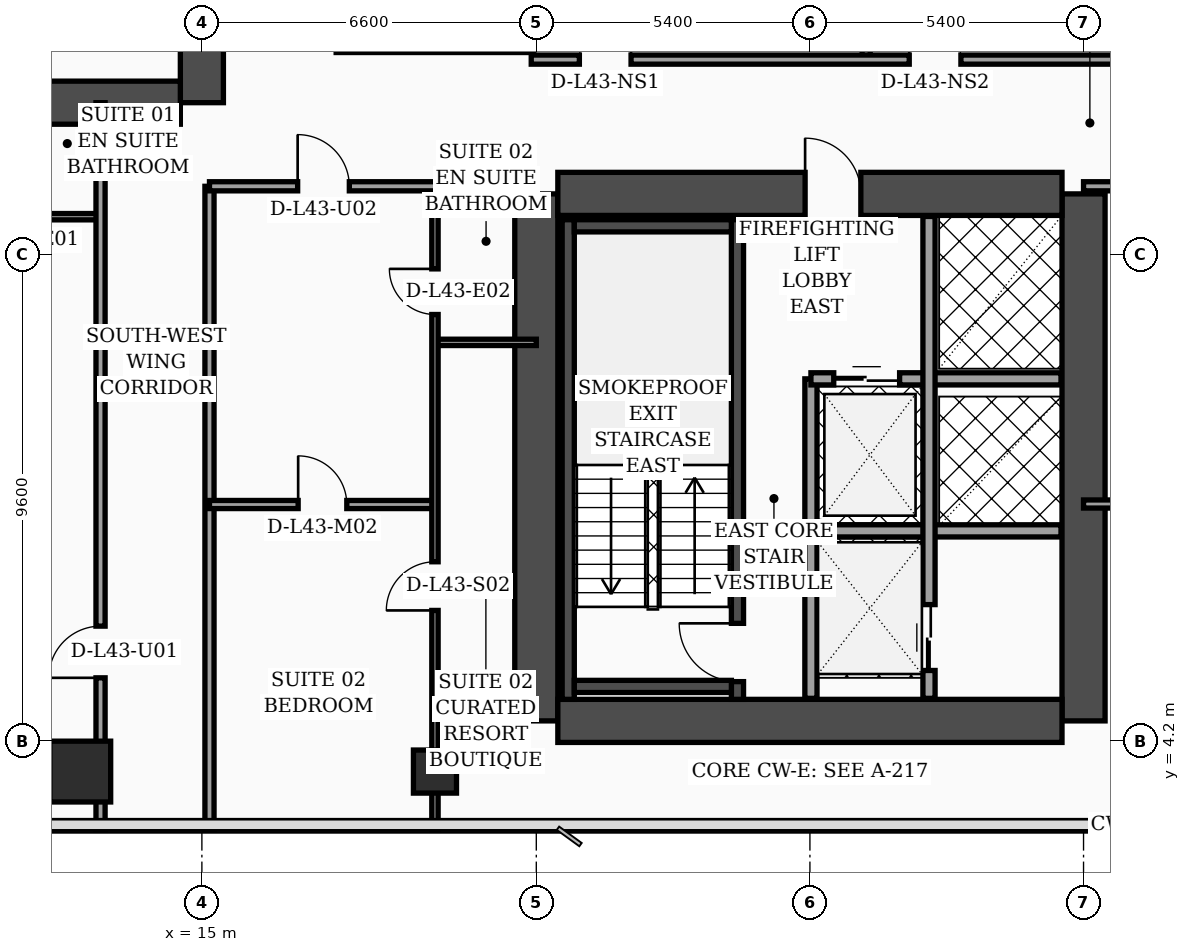
"""IFC4 building model, lengths in metres.
Left out: names, types, materials, properties, quantities, classifications, styles, units other than length and angle.
Written with IfcOpenShell. Run it as: python <this file> out.ifc"""

import sys

from ifc_helpers import new_model, si_unit, direction, frame, frame_2d, origin, origin_2d, place, context, subcontext, project, spatial, rectangle, hollow_rectangle, extrude, element, fill, save


model = new_model("IFC4")
c1 = context("Model", 3, precision=1e-05, world=origin(), true_north=direction((0.0, 1.0)))
c2 = subcontext(c1, "Body", "Model", "MODEL_VIEW")
j1 = project(units=[si_unit("LENGTHUNIT", "METRE"), si_unit("PLANEANGLEUNIT", "RADIAN")], contexts=[c1])
p1 = place(None, origin())
s1 = spatial("IfcSite", under=j1, at=p1, CompositionType="ELEMENT")
p2 = place(p1, origin())
s2 = spatial("IfcBuilding", under=s1, at=p2, CompositionType="ELEMENT")
p3 = place(p2, frame((0.0, 0.0, 175.1)))
s3 = spatial("IfcBuildingStorey", under=s2, at=p3, CompositionType="ELEMENT", Elevation=175.1)
p4 = place(p3, frame((15.0, 16.8, 0.0), z_axis=(0.0, 0.0, 1.0), x_axis=(0.0, 1.0, 0.0)))
e1 = element("IfcWall", 1, at=p4, inside=s3, PredefinedType="SHEAR", context=c2, shape_type="SweptSolid", body=[
    extrude(rectangle(XDim=21.6, YDim=0.85, at=frame_2d((10.8, 0.0))), origin(), (0.0, 0.0, 1.0), 3.56),
])
p5 = place(p4, frame((8.65, 0.0, 0.0)))
e2 = element("IfcOpeningElement", 2, at=p5, cuts=e1, PredefinedType="OPENING", context=c2, shape_type="SweptSolid", body=[
    extrude(rectangle(XDim=1.1, YDim=2.2, at=frame_2d((0.55, 1.1))), frame((0.0, 0.435, 0.0), z_axis=(0.0, -1.0, 0.0), x_axis=(1.0, 0.0, 0.0)), (0.0, 0.0, 1.0), 0.87),
])
p6 = place(p4, frame((10.85, 0.0, 0.0)))
e3 = element("IfcOpeningElement", 3, at=p6, cuts=e1, PredefinedType="OPENING", context=c2, shape_type="SweptSolid", body=[
    extrude(rectangle(XDim=1.1, YDim=2.2, at=frame_2d((0.55, 1.1))), frame((0.0, 0.435, 0.0), z_axis=(0.0, -1.0, 0.0), x_axis=(1.0, 0.0, 0.0)), (0.0, 0.0, 1.0), 0.87),
])
p7 = place(p4, frame((13.5, 0.0, 0.0)))
e4 = element("IfcOpeningElement", 4, at=p7, cuts=e1, PredefinedType="OPENING", context=c2, shape_type="SweptSolid", body=[
    extrude(rectangle(XDim=1.1, YDim=2.2, at=frame_2d((0.55, 1.1))), frame((0.0, 0.435, 0.0), z_axis=(0.0, -1.0, 0.0), x_axis=(1.0, 0.0, 0.0)), (0.0, 0.0, 1.0), 0.87),
])
p8 = place(p4, frame((16.15, 0.0, 0.0)))
e5 = element("IfcOpeningElement", 5, at=p8, cuts=e1, PredefinedType="OPENING", context=c2, shape_type="SweptSolid", body=[
    extrude(rectangle(XDim=1.1, YDim=2.2, at=frame_2d((0.55, 1.1))), frame((0.0, 0.435, 0.0), z_axis=(0.0, -1.0, 0.0), x_axis=(1.0, 0.0, 0.0)), (0.0, 0.0, 1.0), 0.87),
])
p9 = place(p3, frame((4.625, 16.8, 0.0), z_axis=(0.0, 0.0, 1.0), x_axis=(1.0, 0.0, 0.0)))
e6 = element("IfcWall", 6, at=p9, inside=s3, PredefinedType="SHEAR", context=c2, shape_type="SweptSolid", body=[
    extrude(rectangle(XDim=9.95, YDim=0.85, at=frame_2d((4.975, 0.0))), origin(), (0.0, 0.0, 1.0), 3.56),
])
for number, where, z_axis, x_axis in (
    (7, (21.6, 4.6, 0.0), (0.0, 0.0, 1.0), (0.0, 1.0, 0.0)),
    (8, (32.4, 4.6, 0.0), (0.0, 0.0, 1.0), (0.0, 1.0, 0.0)),
):
    element("IfcWall", number, at=place(p3, frame(where, z_axis=z_axis, x_axis=x_axis)), inside=s3, PredefinedType="SHEAR", context=c2, shape_type="SweptSolid", body=[
        extrude(rectangle(XDim=10.4, YDim=0.85, at=frame_2d((5.2, 0.0))), origin(), (0.0, 0.0, 1.0), 3.56),
    ])
p10 = place(p3, frame((22.025, 15.0, 0.0), z_axis=(0.0, 0.0, 1.0), x_axis=(1.0, 0.0, 0.0)))
e9 = element("IfcWall", 9, at=p10, inside=s3, PredefinedType="SHEAR", context=c2, shape_type="SweptSolid", body=[
    extrude(rectangle(XDim=9.95, YDim=0.85, at=frame_2d((4.975, 0.0))), origin(), (0.0, 0.0, 1.0), 3.56),
])
p11 = place(p10, frame((4.88, 0.0, 0.0)))
e10 = element("IfcOpeningElement", 10, at=p11, cuts=e9, PredefinedType="OPENING", context=c2, shape_type="SweptSolid", body=[
    extrude(rectangle(XDim=1.1, YDim=2.2, at=frame_2d((0.55, 1.1))), frame((0.0, 0.435, 0.0), z_axis=(0.0, -1.0, 0.0), x_axis=(1.0, 0.0, 0.0)), (0.0, 0.0, 1.0), 0.87),
])
p12 = place(p3, frame((22.025, 4.6, 0.0), z_axis=(0.0, 0.0, 1.0), x_axis=(1.0, 0.0, 0.0)))
e11 = element("IfcWall", 11, at=p12, inside=s3, PredefinedType="SHEAR", context=c2, shape_type="SweptSolid", body=[
    extrude(rectangle(XDim=9.95, YDim=0.85, at=frame_2d((4.975, 0.0))), origin(), (0.0, 0.0, 1.0), 3.56),
])
p13 = place(p3, frame((22.23, 5.025, 0.0), z_axis=(0.0, 0.0, 1.0), x_axis=(0.0, 1.0, 0.0)))
e12 = element("IfcWall", 12, at=p13, inside=s3, PredefinedType="SOLIDWALL", context=c2, shape_type="SweptSolid", body=[
    extrude(rectangle(XDim=9.465, YDim=0.24, at=frame_2d((4.732, 0.0))), origin(), (0.0, 0.0, 1.0), 3.56),
])
p14 = place(p3, frame((25.57, 5.025, 0.0), z_axis=(0.0, 0.0, 1.0), x_axis=(0.0, 1.0, 0.0)))
e13 = element("IfcWall", 13, at=p14, inside=s3, PredefinedType="SOLIDWALL", context=c2, shape_type="SweptSolid", body=[
    extrude(rectangle(XDim=9.465, YDim=0.24, at=frame_2d((4.732, 0.0))), origin(), (0.0, 0.0, 1.0), 3.56),
])
p15 = place(p14, frame((0.35, 0.0, 0.0)))
e14 = element("IfcOpeningElement", 14, at=p15, cuts=e13, PredefinedType="OPENING", context=c2, shape_type="SweptSolid", body=[
    extrude(rectangle(XDim=1.15, YDim=2.2, at=frame_2d((0.575, 1.1))), frame((0.0, 0.13, 0.0), z_axis=(0.0, -1.0, 0.0), x_axis=(1.0, 0.0, 0.0)), (0.0, 0.0, 1.0), 0.26),
])
for number, where, z_axis, x_axis in (
    (15, (22.35, 5.28, 0.0), (0.0, 0.0, 1.0), (1.0, 0.0, 0.0)),
    (16, (22.35, 14.37, 0.0), (0.0, 0.0, 1.0), (1.0, 0.0, 0.0)),
):
    element("IfcWall", number, at=place(p3, frame(where, z_axis=z_axis, x_axis=x_axis)), inside=s3, PredefinedType="SOLIDWALL", context=c2, shape_type="SweptSolid", body=[
        extrude(rectangle(XDim=3.1, YDim=0.24, at=frame_2d((1.55, 0.0))), origin(), (0.0, 0.0, 1.0), 3.56),
    ])
p16 = place(p3, frame((12.6, 3.6, 0.0), z_axis=(0.0, 0.0, 1.0), x_axis=(1.0, 0.0, 0.0)))
e17 = element("IfcColumn", 17, at=p16, inside=s3, PredefinedType="COLUMN", context=c2, shape_type="SweptSolid", body=[
    extrude(rectangle(XDim=1.2, YDim=1.2, at=origin_2d()), origin(), (0.0, 0.0, 1.0), 3.56),
])
p17 = place(p3, frame((19.6, 3.6, 0.0), z_axis=(0.0, 0.0, 1.0), x_axis=(1.0, 0.0, 0.0)))
e18 = element("IfcColumn", 18, at=p17, inside=s3, PredefinedType="COLUMN", context=c2, shape_type="SweptSolid", body=[
    extrude(hollow_rectangle(XDim=0.85, YDim=0.85, WallThickness=0.036, at=origin_2d()), origin(), (0.0, 0.0, 1.0), 3.56),
])
p18 = place(p3, frame((27.02, 5.045, 0.0), z_axis=(0.0, 0.0, 1.0), x_axis=(0.0, 1.0, 0.0)))
e19 = element("IfcWall", 19, at=p18, inside=s3, PredefinedType="SOLIDWALL", context=c2, shape_type="SweptSolid", body=[
    extrude(rectangle(XDim=6.305, YDim=0.24, at=frame_2d((3.153, 0.0))), origin(), (0.0, 0.0, 1.0), 3.56),
])
p19 = place(p3, frame((27.02, 11.35, 0.0), z_axis=(0.0, 0.0, 1.0), x_axis=(1.0, 0.0, 0.0)))
e20 = element("IfcWall", 20, at=p19, inside=s3, PredefinedType="SOLIDWALL", context=c2, shape_type="SweptSolid", body=[
    extrude(rectangle(XDim=4.935, YDim=0.24, at=frame_2d((2.468, 0.0))), origin(), (0.0, 0.0, 1.0), 3.56),
])
p20 = place(p19, frame((0.45, 0.0, 0.0)))
e21 = element("IfcOpeningElement", 21, at=p20, cuts=e20, PredefinedType="OPENING", context=c2, shape_type="SweptSolid", body=[
    extrude(rectangle(XDim=1.3, YDim=2.35, at=frame_2d((0.65, 1.175))), frame((0.0, 0.13, 0.0), z_axis=(0.0, -1.0, 0.0), x_axis=(1.0, 0.0, 0.0)), (0.0, 0.0, 1.0), 0.26),
])
p21 = place(p3, frame((27.02, 8.35, 0.0), z_axis=(0.0, 0.0, 1.0), x_axis=(1.0, 0.0, 0.0)))
e22 = element("IfcWall", 22, at=p21, inside=s3, PredefinedType="SOLIDWALL", context=c2, shape_type="SweptSolid", body=[
    extrude(rectangle(XDim=4.935, YDim=0.24, at=frame_2d((2.468, 0.0))), origin(), (0.0, 0.0, 1.0), 3.56),
])
p22 = place(p3, frame((29.35, 5.045, 0.0), z_axis=(0.0, 0.0, 1.0), x_axis=(0.0, 1.0, 0.0)))
e23 = element("IfcWall", 23, at=p22, inside=s3, PredefinedType="SOLIDWALL", context=c2, shape_type="SweptSolid", body=[
    extrude(rectangle(XDim=9.51, YDim=0.24, at=frame_2d((4.755, 0.0))), origin(), (0.0, 0.0, 1.0), 3.56),
])
p23 = place(p22, frame((0.55, 0.0, 0.0)))
e24 = element("IfcOpeningElement", 24, at=p23, cuts=e23, PredefinedType="OPENING", context=c2, shape_type="SweptSolid", body=[
    extrude(rectangle(XDim=1.3, YDim=2.35, at=frame_2d((0.65, 1.175))), frame((0.0, 0.13, 0.0), z_axis=(0.0, -1.0, 0.0), x_axis=(1.0, 0.0, 0.0)), (0.0, 0.0, 1.0), 0.26),
])
p24 = place(p3, frame((3.2, 14.55, 0.0), z_axis=(0.0, 0.0, 1.0), x_axis=(1.0, 0.0, 0.0)))
e25 = element("IfcWall", 25, at=p24, inside=s3, PredefinedType="PARTITIONING", context=c2, shape_type="SweptSolid", body=[
    extrude(rectangle(XDim=9.8, YDim=0.125, at=frame_2d((4.9, 0.0))), origin(), (0.0, 0.0, 1.0), 2.94),
])
p25 = place(p24, frame((3.32, 0.0, 0.0)))
e26 = element("IfcOpeningElement", 26, at=p25, cuts=e25, PredefinedType="OPENING", context=c2, shape_type="SweptSolid", body=[
    extrude(rectangle(XDim=0.96, YDim=2.2, at=frame_2d((0.48, 1.1))), frame((0.0, 0.073, 0.0), z_axis=(0.0, -1.0, 0.0), x_axis=(1.0, 0.0, 0.0)), (0.0, 0.0, 1.0), 0.145),
])
p26 = place(p24, frame((7.89, 0.0, 0.0)))
e27 = element("IfcOpeningElement", 27, at=p26, cuts=e25, PredefinedType="OPENING", context=c2, shape_type="SweptSolid", body=[
    extrude(rectangle(XDim=0.9, YDim=2.15, at=frame_2d((0.45, 1.075))), frame((0.0, 0.073, 0.0), z_axis=(0.0, -1.0, 0.0), x_axis=(1.0, 0.0, 0.0)), (0.0, 0.0, 1.0), 0.145),
])
p27 = place(p3, frame((13.0, 2.44, 0.0), z_axis=(0.0, 0.0, 1.0), x_axis=(0.0, 1.0, 0.0)))
e28 = element("IfcWall", 28, at=p27, inside=s3, PredefinedType="PARTITIONING", context=c2, shape_type="SweptSolid", body=[
    extrude(rectangle(XDim=14.36, YDim=0.18, at=frame_2d((7.18, 0.0))), origin(), (0.0, 0.0, 1.0), 2.94),
])
p28 = place(p27, frame((3.01, 0.0, 0.0)))
e29 = element("IfcOpeningElement", 29, at=p28, cuts=e28, PredefinedType="OPENING", context=c2, shape_type="SweptSolid", body=[
    extrude(rectangle(XDim=1.02, YDim=2.2, at=frame_2d((0.51, 1.1))), frame((0.0, 0.1, 0.0), z_axis=(0.0, -1.0, 0.0), x_axis=(1.0, 0.0, 0.0)), (0.0, 0.0, 1.0), 0.2),
])
p29 = place(p3, frame((15.15, 2.44, 0.0), z_axis=(0.0, 0.0, 1.0), x_axis=(0.0, 1.0, 0.0)))
e30 = element("IfcWall", 30, at=p29, inside=s3, PredefinedType="PARTITIONING", context=c2, shape_type="SweptSolid", body=[
    extrude(rectangle(XDim=12.71, YDim=0.18, at=frame_2d((6.355, 0.0))), origin(), (0.0, 0.0, 1.0), 3.04),
])
p30 = place(p3, frame((19.6, 12.07, 0.0), z_axis=(0.0, 0.0, 1.0), x_axis=(1.0, 0.0, 0.0)))
e31 = element("IfcWall", 31, at=p30, inside=s3, PredefinedType="PARTITIONING", context=c2, shape_type="SweptSolid", body=[
    extrude(rectangle(XDim=2.0, YDim=0.125, at=frame_2d((1.0, 0.0))), origin(), (0.0, 0.0, 1.0), 3.56),
])
p31 = place(p3, frame((15.15, 8.87, 0.0), z_axis=(0.0, 0.0, 1.0), x_axis=(1.0, 0.0, 0.0)))
e32 = element("IfcWall", 32, at=p31, inside=s3, PredefinedType="PARTITIONING", context=c2, shape_type="SweptSolid", body=[
    extrude(rectangle(XDim=4.45, YDim=0.16, at=frame_2d((2.225, 0.0))), origin(), (0.0, 0.0, 1.0), 3.56),
])
p32 = place(p31, frame((1.75, 0.0, 0.0)))
e33 = element("IfcOpeningElement", 33, at=p32, cuts=e32, PredefinedType="OPENING", context=c2, shape_type="SweptSolid", body=[
    extrude(rectangle(XDim=0.96, YDim=2.2, at=frame_2d((0.48, 1.1))), frame((0.0, 0.09, 0.0), z_axis=(0.0, -1.0, 0.0), x_axis=(1.0, 0.0, 0.0)), (0.0, 0.0, 1.0), 0.18),
])
p33 = place(p3, frame((19.6, 2.44, 0.0), z_axis=(0.0, 0.0, 1.0), x_axis=(0.0, 1.0, 0.0)))
e34 = element("IfcWall", 34, at=p33, inside=s3, PredefinedType="PARTITIONING", context=c2, shape_type="SweptSolid", body=[
    extrude(rectangle(XDim=12.71, YDim=0.125, at=frame_2d((6.355, 0.0))), origin(), (0.0, 0.0, 1.0), 2.49),
])
p34 = place(p33, frame((4.34, 0.0, 0.0)))
e35 = element("IfcOpeningElement", 35, at=p34, cuts=e34, PredefinedType="OPENING", context=c2, shape_type="SweptSolid", body=[
    extrude(rectangle(XDim=0.96, YDim=2.2, at=frame_2d((0.48, 1.1))), frame((0.0, 0.073, 0.0), z_axis=(0.0, -1.0, 0.0), x_axis=(1.0, 0.0, 0.0)), (0.0, 0.0, 1.0), 0.145),
])
p35 = place(p33, frame((10.18, 0.0, 0.0)))
e36 = element("IfcOpeningElement", 36, at=p35, cuts=e34, PredefinedType="OPENING", context=c2, shape_type="SweptSolid", body=[
    extrude(rectangle(XDim=0.9, YDim=2.15, at=frame_2d((0.45, 1.075))), frame((0.0, 0.073, 0.0), z_axis=(0.0, -1.0, 0.0), x_axis=(1.0, 0.0, 0.0)), (0.0, 0.0, 1.0), 0.145),
])
p36 = place(p3, frame((15.15, 15.15, 0.0), z_axis=(0.0, 0.0, 1.0), x_axis=(1.0, 0.0, 0.0)))
e37 = element("IfcWall", 37, at=p36, inside=s3, PredefinedType="PARTITIONING", context=c2, shape_type="SweptSolid", body=[
    extrude(rectangle(XDim=6.45, YDim=0.18, at=frame_2d((3.225, 0.0))), origin(), (0.0, 0.0, 1.0), 2.49),
])
p37 = place(p36, frame((1.74, 0.0, 0.0)))
e38 = element("IfcOpeningElement", 38, at=p37, cuts=e37, PredefinedType="OPENING", context=c2, shape_type="SweptSolid", body=[
    extrude(rectangle(XDim=1.02, YDim=2.2, at=frame_2d((0.51, 1.1))), frame((0.0, 0.1, 0.0), z_axis=(0.0, -1.0, 0.0), x_axis=(1.0, 0.0, 0.0)), (0.0, 0.0, 1.0), 0.2),
])
p38 = place(p3, frame((17.65, 17.88, 0.0), z_axis=(0.0, 0.0, 1.0), x_axis=(1.0, 0.0, 0.0)))
e39 = element("IfcWall", 39, at=p38, inside=s3, PredefinedType="PARTITIONING", context=c2, shape_type="SweptSolid", body=[
    extrude(rectangle(XDim=3.9, YDim=0.18, at=frame_2d((1.95, 0.0))), origin(), (0.0, 0.0, 1.0), 3.09),
])
p39 = place(p3, frame((32.4, 8.88, 0.0), z_axis=(0.0, 0.0, 1.0), x_axis=(1.0, 0.0, 0.0)))
e40 = element("IfcWall", 40, at=p39, inside=s3, PredefinedType="PARTITIONING", context=c2, shape_type="SweptSolid", body=[
    extrude(rectangle(XDim=4.15, YDim=0.16, at=frame_2d((2.075, 0.0))), origin(), (0.0, 0.0, 1.0), 2.94),
])
p40 = place(p39, frame((1.59, 0.0, 0.0)))
e41 = element("IfcOpeningElement", 41, at=p40, cuts=e40, PredefinedType="OPENING", context=c2, shape_type="SweptSolid", body=[
    extrude(rectangle(XDim=0.96, YDim=2.2, at=frame_2d((0.48, 1.1))), frame((0.0, 0.09, 0.0), z_axis=(0.0, -1.0, 0.0), x_axis=(1.0, 0.0, 0.0)), (0.0, 0.0, 1.0), 0.18),
])
p41 = place(p3, frame((32.4, 15.15, 0.0), z_axis=(0.0, 0.0, 1.0), x_axis=(1.0, 0.0, 0.0)))
e42 = element("IfcWall", 42, at=p41, inside=s3, PredefinedType="PARTITIONING", context=c2, shape_type="SweptSolid", body=[
    extrude(rectangle(XDim=15.0, YDim=0.18, at=frame_2d((7.5, 0.0))), origin(), (0.0, 0.0, 1.0), 2.94),
])
p42 = place(p41, frame((1.66, 0.0, 0.0)))
e43 = element("IfcOpeningElement", 43, at=p42, cuts=e42, PredefinedType="OPENING", context=c2, shape_type="SweptSolid", body=[
    extrude(rectangle(XDim=1.02, YDim=2.2, at=frame_2d((0.51, 1.1))), frame((0.0, 0.1, 0.0), z_axis=(0.0, -1.0, 0.0), x_axis=(1.0, 0.0, 0.0)), (0.0, 0.0, 1.0), 0.2),
])
p43 = place(p41, frame((10.79, 0.0, 0.0)))
e44 = element("IfcOpeningElement", 44, at=p43, cuts=e42, PredefinedType="OPENING", context=c2, shape_type="SweptSolid", body=[
    extrude(rectangle(XDim=1.02, YDim=2.2, at=frame_2d((0.51, 1.1))), frame((0.0, 0.1, 0.0), z_axis=(0.0, -1.0, 0.0), x_axis=(1.0, 0.0, 0.0)), (0.0, 0.0, 1.0), 0.2),
])
p44 = place(p41, frame((6.62, 0.0, 0.0)))
e45 = element("IfcOpeningElement", 45, at=p44, cuts=e42, PredefinedType="OPENING", context=c2, shape_type="SweptSolid", body=[
    extrude(rectangle(XDim=1.02, YDim=2.2, at=frame_2d((0.51, 1.1))), frame((0.0, 0.1, 0.0), z_axis=(0.0, -1.0, 0.0), x_axis=(1.0, 0.0, 0.0)), (0.0, 0.0, 1.0), 0.2),
])
p45 = place(p3, frame((28.11, 17.65, 0.0), z_axis=(0.0, 0.0, 1.0), x_axis=(0.0, 1.0, 0.0)))
e46 = element("IfcWall", 46, at=p45, inside=s3, PredefinedType="PARTITIONING", context=c2, shape_type="SweptSolid", body=[
    extrude(rectangle(XDim=10.46, YDim=0.16, at=frame_2d((5.23, 0.0))), origin(), (0.0, 0.0, 1.0), 2.94),
])
p46 = place(p3, frame((21.5, 17.65, 0.0), z_axis=(0.0, 0.0, 1.0), x_axis=(1.0, 0.0, 0.0)))
e47 = element("IfcWall", 47, at=p46, inside=s3, PredefinedType="PARTITIONING", context=c2, shape_type="SweptSolid", body=[
    extrude(rectangle(XDim=23.55, YDim=0.18, at=frame_2d((11.775, 0.0))), origin(), (0.0, 0.0, 1.0), 2.94),
])
p47 = place(p46, frame((0.95, 0.0, 0.0)))
e48 = element("IfcOpeningElement", 48, at=p47, cuts=e47, PredefinedType="OPENING", context=c2, shape_type="SweptSolid", body=[
    extrude(rectangle(XDim=1.02, YDim=2.2, at=frame_2d((0.51, 1.1))), frame((0.0, 0.1, 0.0), z_axis=(0.0, -1.0, 0.0), x_axis=(1.0, 0.0, 0.0)), (0.0, 0.0, 1.0), 0.2),
])
p48 = place(p46, frame((7.46, 0.0, 0.0)))
e49 = element("IfcOpeningElement", 49, at=p48, cuts=e47, PredefinedType="OPENING", context=c2, shape_type="SweptSolid", body=[
    extrude(rectangle(XDim=1.02, YDim=2.2, at=frame_2d((0.51, 1.1))), frame((0.0, 0.1, 0.0), z_axis=(0.0, -1.0, 0.0), x_axis=(1.0, 0.0, 0.0)), (0.0, 0.0, 1.0), 0.2),
])
p49 = place(p46, frame((12.68, 0.0, 0.0)))
e50 = element("IfcOpeningElement", 50, at=p49, cuts=e47, PredefinedType="OPENING", context=c2, shape_type="SweptSolid", body=[
    extrude(rectangle(XDim=1.02, YDim=2.2, at=frame_2d((0.51, 1.1))), frame((0.0, 0.1, 0.0), z_axis=(0.0, -1.0, 0.0), x_axis=(1.0, 0.0, 0.0)), (0.0, 0.0, 1.0), 0.2),
])
p50 = place(p46, frame((18.54, 0.0, 0.0)))
e51 = element("IfcOpeningElement", 51, at=p50, cuts=e47, PredefinedType="OPENING", context=c2, shape_type="SweptSolid", body=[
    extrude(rectangle(XDim=1.02, YDim=2.2, at=frame_2d((0.51, 1.1))), frame((0.0, 0.1, 0.0), z_axis=(0.0, -1.0, 0.0), x_axis=(1.0, 0.0, 0.0)), (0.0, 0.0, 1.0), 0.2),
])
p51 = place(p20, origin())
e52 = element("IfcDoor", 52, at=p51, inside=s3, OperationType="DOUBLE_DOOR_SLIDING", PredefinedType="DOOR", context=c2, shape_type="SweptSolid", body=[
    extrude(rectangle(XDim=1.3, YDim=2.35, at=frame_2d((0.65, 1.175))), frame((0.0, 0.025, 0.0), z_axis=(0.0, -1.0, 0.0), x_axis=(1.0, 0.0, 0.0)), (0.0, 0.0, 1.0), 0.05),
])
fill(e21, e52)
p52 = place(p23, origin())
e53 = element("IfcDoor", 53, at=p52, inside=s3, OperationType="DOUBLE_DOOR_SLIDING", PredefinedType="DOOR", context=c2, shape_type="SweptSolid", body=[
    extrude(rectangle(XDim=1.3, YDim=2.35, at=frame_2d((0.65, 1.175))), frame((0.0, 0.025, 0.0), z_axis=(0.0, -1.0, 0.0), x_axis=(1.0, 0.0, 0.0)), (0.0, 0.0, 1.0), 0.05),
])
fill(e24, e53)
p53 = place(p28, origin())
e54 = element("IfcDoor", 54, at=p53, inside=s3, OperationType="SINGLE_SWING_LEFT", PredefinedType="DOOR", context=c2, shape_type="SweptSolid", body=[
    extrude(rectangle(XDim=1.02, YDim=2.2, at=frame_2d((0.51, 1.1))), frame((0.0, 0.025, 0.0), z_axis=(0.0, -1.0, 0.0), x_axis=(1.0, 0.0, 0.0)), (0.0, 0.0, 1.0), 0.05),
])
fill(e29, e54)
p54 = place(p32, origin())
e55 = element("IfcDoor", 55, at=p54, inside=s3, OperationType="SINGLE_SWING_LEFT", PredefinedType="DOOR", context=c2, shape_type="SweptSolid", body=[
    extrude(rectangle(XDim=0.96, YDim=2.2, at=frame_2d((0.48, 1.1))), frame((0.0, 0.025, 0.0), z_axis=(0.0, -1.0, 0.0), x_axis=(1.0, 0.0, 0.0)), (0.0, 0.0, 1.0), 0.05),
])
fill(e33, e55)
p55 = place(p34, origin())
e56 = element("IfcDoor", 56, at=p55, inside=s3, OperationType="SINGLE_SWING_LEFT", PredefinedType="DOOR", context=c2, shape_type="SweptSolid", body=[
    extrude(rectangle(XDim=0.96, YDim=2.2, at=frame_2d((0.48, 1.1))), frame((0.0, 0.025, 0.0), z_axis=(0.0, -1.0, 0.0), x_axis=(1.0, 0.0, 0.0)), (0.0, 0.0, 1.0), 0.05),
])
fill(e35, e56)
p56 = place(p35, origin())
e57 = element("IfcDoor", 57, at=p56, inside=s3, OperationType="SINGLE_SWING_RIGHT", PredefinedType="DOOR", context=c2, shape_type="SweptSolid", body=[
    extrude(rectangle(XDim=0.9, YDim=2.15, at=frame_2d((0.45, 1.075))), frame((0.0, 0.025, 0.0), z_axis=(0.0, -1.0, 0.0), x_axis=(1.0, 0.0, 0.0)), (0.0, 0.0, 1.0), 0.05),
])
fill(e36, e57)
p57 = place(p37, origin())
e58 = element("IfcDoor", 58, at=p57, inside=s3, OperationType="SINGLE_SWING_LEFT", PredefinedType="DOOR", context=c2, shape_type="SweptSolid", body=[
    extrude(rectangle(XDim=1.02, YDim=2.2, at=frame_2d((0.51, 1.1))), frame((0.0, 0.025, 0.0), z_axis=(0.0, -1.0, 0.0), x_axis=(1.0, 0.0, 0.0)), (0.0, 0.0, 1.0), 0.05),
])
fill(e38, e58)
p58 = place(p47, origin())
e59 = element("IfcDoor", 59, at=p58, inside=s3, OperationType="SINGLE_SWING_RIGHT", PredefinedType="DOOR", context=c2, shape_type="SweptSolid", body=[
    extrude(rectangle(XDim=1.02, YDim=2.2, at=frame_2d((0.51, 1.1))), frame((0.0, 0.025, 0.0), z_axis=(0.0, -1.0, 0.0), x_axis=(1.0, 0.0, 0.0)), (0.0, 0.0, 1.0), 0.05),
])
fill(e48, e59)
p59 = place(p48, origin())
e60 = element("IfcDoor", 60, at=p59, inside=s3, OperationType="SINGLE_SWING_LEFT", PredefinedType="DOOR", context=c2, shape_type="SweptSolid", body=[
    extrude(rectangle(XDim=1.02, YDim=2.2, at=frame_2d((0.51, 1.1))), frame((0.0, 0.025, 0.0), z_axis=(0.0, -1.0, 0.0), x_axis=(1.0, 0.0, 0.0)), (0.0, 0.0, 1.0), 0.05),
])
fill(e49, e60)
p60 = place(p15, origin())
e61 = element("IfcDoor", 61, at=p60, inside=s3, OperationType="SINGLE_SWING_RIGHT", PredefinedType="DOOR", context=c2, shape_type="SweptSolid", body=[
    extrude(rectangle(XDim=1.15, YDim=2.2, at=frame_2d((0.575, 1.1))), frame((0.0, 0.025, 0.0), z_axis=(0.0, -1.0, 0.0), x_axis=(1.0, 0.0, 0.0)), (0.0, 0.0, 1.0), 0.05),
])
fill(e14, e61)
p61 = place(p11, origin())
e62 = element("IfcDoor", 62, at=p61, inside=s3, OperationType="SINGLE_SWING_LEFT", PredefinedType="DOOR", context=c2, shape_type="SweptSolid", body=[
    extrude(rectangle(XDim=1.1, YDim=2.2, at=frame_2d((0.55, 1.1))), frame((0.0, 0.025, 0.0), z_axis=(0.0, -1.0, 0.0), x_axis=(1.0, 0.0, 0.0)), (0.0, 0.0, 1.0), 0.05),
])
fill(e10, e62)
save(model, sys.argv[1])
